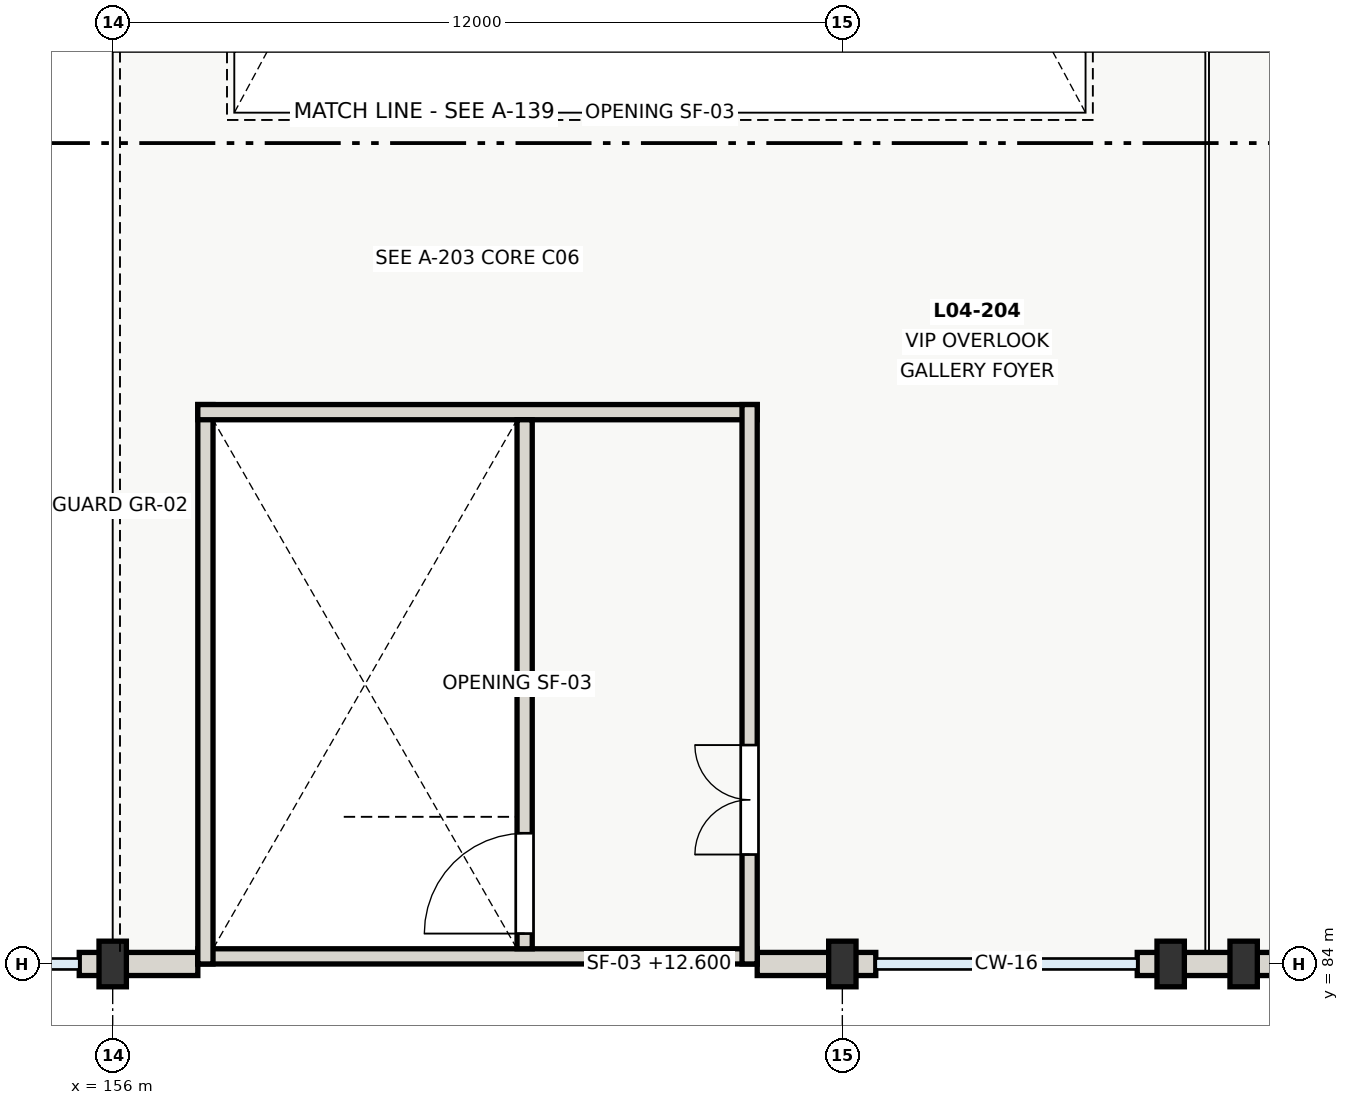
"""IFC4 building model, lengths in metres.
Left out: names, types, materials, properties, quantities, classifications, styles, units other than length and angle.
Written with IfcOpenShell. Run it as: python <this file> out.ifc"""

import sys

from ifc_helpers import new_model, si_unit, direction, frame, frame_2d, origin, origin_2d, place, context, subcontext, project, spatial, rectangle, extrude, element, fill, save


model = new_model("IFC4")
c1 = context("Model", 3, precision=1e-05, world=origin(), true_north=direction((0.0, 1.0)))
c2 = subcontext(c1, "Body", "Model", "MODEL_VIEW")
j1 = project(units=[si_unit("LENGTHUNIT", "METRE"), si_unit("PLANEANGLEUNIT", "RADIAN")], contexts=[c1])
p1 = place(None, origin())
s1 = spatial("IfcSite", under=j1, at=p1, CompositionType="ELEMENT")
p2 = place(p1, origin())
s2 = spatial("IfcBuilding", under=s1, at=p2, CompositionType="ELEMENT")
p3 = place(p2, frame((0.0, 0.0, 12.6)))
s3 = spatial("IfcBuildingStorey", under=s2, at=p3, CompositionType="ELEMENT", Elevation=12.6)
for number, where, z_axis, x_axis in (
    (1, (156.0, 84.0, 0.0), (0.0, 0.0, 1.0), (1.0, 0.0, 0.0)),
    (2, (168.0, 84.0, 0.0), (0.0, 0.0, 1.0), (1.0, 0.0, 0.0)),
    (3, (173.4, 84.0, 0.0), (0.0, 0.0, 1.0), (1.0, 0.0, 0.0)),
    (4, (174.6, 84.0, 0.0), (0.0, 0.0, 1.0), (1.0, 0.0, 0.0)),
):
    element("IfcColumn", number, at=place(p3, frame(where, z_axis=z_axis, x_axis=x_axis)), inside=s3, PredefinedType="PILASTER", context=c2, shape_type="SweptSolid", body=[
        extrude(rectangle(XDim=0.45, YDim=0.75, at=origin_2d()), origin(), (0.0, 0.0, 1.0), 4.8),
    ])
p4 = place(p3, frame((155.998, 84.0, 0.0), z_axis=(0.0, 0.0, 1.0), x_axis=(-1.0, 0.0, 0.0)))
e5 = element("IfcWall", 5, at=p4, inside=s3, PredefinedType="SOLIDWALL", context=c2, shape_type="SweptSolid", body=[
    extrude(rectangle(XDim=0.548, YDim=0.38, at=frame_2d((0.274, 0.0))), origin(), (0.0, 0.0, 1.0), 3.45),
])
for number, where, z_axis, x_axis in (
    (6, (157.4, 84.0, 0.0), (0.0, 0.0, 1.0), (-1.0, 0.0, 0.0)),
    (7, (168.0, 84.0, 0.0), (0.0, 0.0, 1.0), (-1.0, 0.0, 0.0)),
):
    element("IfcWall", number, at=place(p3, frame(where, z_axis=z_axis, x_axis=x_axis)), inside=s3, PredefinedType="SOLIDWALL", context=c2, shape_type="SweptSolid", body=[
        extrude(rectangle(XDim=1.4, YDim=0.38, at=frame_2d((0.7, 0.0))), origin(), (0.0, 0.0, 1.0), 3.69),
    ])
p5 = place(p3, frame((168.55, 84.0, 0.0), z_axis=(0.0, 0.0, 1.0), x_axis=(-1.0, 0.0, 0.0)))
e8 = element("IfcWall", 8, at=p5, inside=s3, PredefinedType="SOLIDWALL", context=c2, shape_type="SweptSolid", body=[
    extrude(rectangle(XDim=0.548, YDim=0.38, at=frame_2d((0.274, 0.0))), origin(), (0.0, 0.0, 1.0), 3.45),
])
for number, where, z_axis, x_axis in (
    (9, (173.398, 84.0, 0.0), (0.0, 0.0, 1.0), (-1.0, 0.0, 0.0)),
    (10, (175.15, 84.0, 0.0), (0.0, 0.0, 1.0), (-1.0, 0.0, 0.0)),
):
    element("IfcWall", number, at=place(p3, frame(where, z_axis=z_axis, x_axis=x_axis)), inside=s3, PredefinedType="SOLIDWALL", context=c2, shape_type="SweptSolid", body=[
        extrude(rectangle(XDim=0.548, YDim=0.38, at=frame_2d((0.274, 0.0))), origin(), (0.0, 0.0, 1.0), 3.45),
    ])
p6 = place(p3, frame((174.6, 84.0, 0.0), z_axis=(0.0, 0.0, 1.0), x_axis=(-1.0, 0.0, 0.0)))
e11 = element("IfcWall", 11, at=p6, inside=s3, PredefinedType="SOLIDWALL", context=c2, shape_type="SweptSolid", body=[
    extrude(rectangle(XDim=1.2, YDim=0.38, at=frame_2d((0.6, 0.0))), origin(), (0.0, 0.0, 1.0), 4.2),
])
p7 = place(p3, frame((166.6, 84.125, 0.0), z_axis=(0.0, 0.0, 1.0), x_axis=(-1.0, 0.0, 0.0)))
e12 = element("IfcWall", 12, at=p7, inside=s3, PredefinedType="SHEAR", context=c2, shape_type="SweptSolid", body=[
    extrude(rectangle(XDim=9.2, YDim=0.25, at=frame_2d((4.6, 0.0))), origin(), (0.0, 0.0, 1.0), 4.2),
])
p8 = place(p3, frame((157.525, 84.0, 0.0), z_axis=(0.0, 0.0, 1.0), x_axis=(0.0, 1.0, 0.0)))
e13 = element("IfcWall", 13, at=p8, inside=s3, PredefinedType="SHEAR", context=c2, shape_type="SweptSolid", body=[
    extrude(rectangle(XDim=9.2, YDim=0.25, at=frame_2d((4.6, 0.0))), origin(), (0.0, 0.0, 1.0), 4.2),
])
p9 = place(p3, frame((157.4, 93.075, 0.0), z_axis=(0.0, 0.0, 1.0), x_axis=(1.0, 0.0, 0.0)))
e14 = element("IfcWall", 14, at=p9, inside=s3, PredefinedType="SHEAR", context=c2, shape_type="SweptSolid", body=[
    extrude(rectangle(XDim=9.2, YDim=0.25, at=frame_2d((4.6, 0.0))), origin(), (0.0, 0.0, 1.0), 4.2),
])
p10 = place(p3, frame((166.475, 84.0, 0.0), z_axis=(0.0, 0.0, 1.0), x_axis=(0.0, 1.0, 0.0)))
e15 = element("IfcWall", 15, at=p10, inside=s3, PredefinedType="SHEAR", context=c2, shape_type="SweptSolid", body=[
    extrude(rectangle(XDim=9.2, YDim=0.25, at=frame_2d((4.6, 0.0))), origin(), (0.0, 0.0, 1.0), 4.2),
])
p11 = place(p10, frame((1.8, 0.0, 0.0)))
e16 = element("IfcOpeningElement", 16, at=p11, cuts=e15, PredefinedType="OPENING", context=c2, shape_type="SweptSolid", body=[
    extrude(rectangle(XDim=1.8, YDim=2.15, at=frame_2d((0.9, 1.075))), frame((0.0, 0.135, 0.0), z_axis=(0.0, -1.0, 0.0), x_axis=(1.0, 0.0, 0.0)), (0.0, 0.0, 1.0), 0.27),
])
p12 = place(p3, frame((162.775, 84.25, 0.0), z_axis=(0.0, 0.0, 1.0), x_axis=(0.0, 1.0, 0.0)))
e17 = element("IfcWall", 17, at=p12, inside=s3, PredefinedType="SHEAR", context=c2, shape_type="SweptSolid", body=[
    extrude(rectangle(XDim=8.7, YDim=0.25, at=frame_2d((4.35, 0.0))), origin(), (0.0, 0.0, 1.0), 4.2),
])
p13 = place(p12, frame((0.25, 0.0, 0.0)))
e18 = element("IfcOpeningElement", 18, at=p13, cuts=e17, PredefinedType="OPENING", context=c2, shape_type="SweptSolid", body=[
    extrude(rectangle(XDim=1.65, YDim=2.1, at=frame_2d((0.825, 1.05))), frame((0.0, 0.135, 0.0), z_axis=(0.0, -1.0, 0.0), x_axis=(1.0, 0.0, 0.0)), (0.0, 0.0, 1.0), 0.27),
])
p14 = place(p11, origin())
e19 = element("IfcDoor", 19, at=p14, inside=s3, OperationType="DOUBLE_DOOR_SINGLE_SWING", PredefinedType="DOOR", context=c2, shape_type="SweptSolid", body=[
    extrude(rectangle(XDim=1.8, YDim=2.15, at=frame_2d((0.9, 1.075))), frame((0.0, 0.025, 0.0), z_axis=(0.0, -1.0, 0.0), x_axis=(1.0, 0.0, 0.0)), (0.0, 0.0, 1.0), 0.05),
])
fill(e16, e19)
p15 = place(p13, origin())
e20 = element("IfcDoor", 20, at=p15, inside=s3, OperationType="SINGLE_SWING_LEFT", PredefinedType="DOOR", context=c2, shape_type="SweptSolid", body=[
    extrude(rectangle(XDim=1.65, YDim=2.1, at=frame_2d((0.825, 1.05))), frame((0.0, 0.025, 0.0), z_axis=(0.0, -1.0, 0.0), x_axis=(1.0, 0.0, 0.0)), (0.0, 0.0, 1.0), 0.05),
])
fill(e18, e20)
save(model, sys.argv[1])
